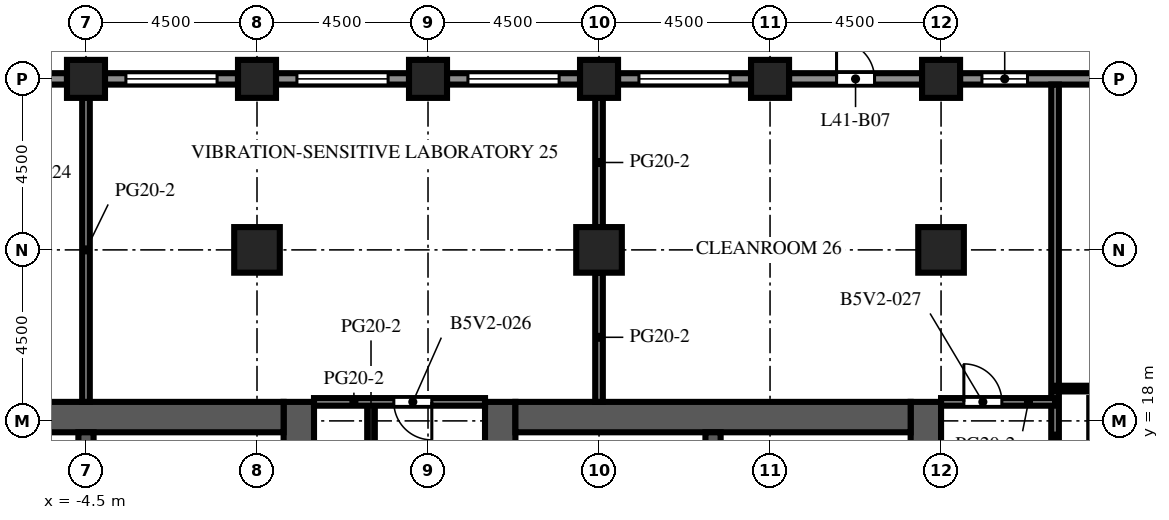
"""IFC4 building model, lengths in metres.
Left out: names, types, materials, properties, quantities, classifications, styles, units other than length and angle.
Written with IfcOpenShell. Run it as: python <this file> out.ifc"""

import sys

from ifc_helpers import new_model, si_unit, direction, frame, frame_2d, origin, origin_2d, place, context, subcontext, project, spatial, rectangle, extrude, element, fill, save


model = new_model("IFC4")
c1 = context("Model", 3, precision=1e-05, world=origin(), true_north=direction((0.0, 1.0)))
c2 = subcontext(c1, "Body", "Model", "MODEL_VIEW")
j1 = project(units=[si_unit("LENGTHUNIT", "METRE"), si_unit("PLANEANGLEUNIT", "RADIAN")], contexts=[c1])
p1 = place(None, origin())
s1 = spatial("IfcSite", under=j1, at=p1, CompositionType="ELEMENT")
p2 = place(p1, origin())
s2 = spatial("IfcBuilding", under=s1, at=p2, CompositionType="ELEMENT")
p3 = place(p2, frame((0.0, 0.0, 181.4)))
s3 = spatial("IfcBuildingStorey", under=s2, at=p3, CompositionType="ELEMENT", Elevation=181.4)
for number, where, z_axis, x_axis in (
    (1, (-4.5, 27.0, 0.0), (0.0, 0.0, 1.0), (1.0, 0.0, 0.0)),
    (2, (0.0, 27.0, 0.0), (0.0, 0.0, 1.0), (1.0, 0.0, 0.0)),
    (3, (4.5, 27.0, 0.0), (0.0, 0.0, 1.0), (1.0, 0.0, 0.0)),
    (4, (9.0, 27.0, 0.0), (0.0, 0.0, 1.0), (1.0, 0.0, 0.0)),
    (5, (13.5, 27.0, 0.0), (0.0, 0.0, 1.0), (1.0, 0.0, 0.0)),
    (6, (18.0, 27.0, 0.0), (0.0, 0.0, 1.0), (1.0, 0.0, 0.0)),
):
    element("IfcColumn", number, at=place(p3, frame(where, z_axis=z_axis, x_axis=x_axis)), inside=s3, PredefinedType="COLUMN", context=c2, shape_type="SweptSolid", body=[
        extrude(rectangle(XDim=1.0, YDim=1.0, at=origin_2d()), origin(), (0.0, 0.0, 1.0), 4.1),
    ])
for number, where, z_axis, x_axis in (
    (7, (0.0, 22.5, 0.0), (0.0, 0.0, 1.0), (1.0, 0.0, 0.0)),
    (8, (9.0, 22.5, 0.0), (0.0, 0.0, 1.0), (1.0, 0.0, 0.0)),
    (9, (18.0, 22.5, 0.0), (0.0, 0.0, 1.0), (1.0, 0.0, 0.0)),
):
    element("IfcColumn", number, at=place(p3, frame(where, z_axis=z_axis, x_axis=x_axis)), inside=s3, PredefinedType="COLUMN", context=c2, shape_type="SweptSolid", body=[
        extrude(rectangle(XDim=1.2, YDim=1.2, at=origin_2d()), origin(), (0.0, 0.0, 1.0), 4.1),
    ])
p4 = place(p3, frame((1.1, -9.0, 0.0), z_axis=(0.0, 0.0, 1.0), x_axis=(0.0, 1.0, 0.0)))
e10 = element("IfcWall", 10, at=p4, inside=s3, PredefinedType="SHEAR", context=c2, shape_type="SweptSolid", body=[
    extrude(rectangle(XDim=27.5, YDim=0.8, at=frame_2d((13.75, 0.0))), origin(), (0.0, 0.0, 1.0), 4.1),
])
p5 = place(p4, frame((12.55, 0.0, 0.0)))
e11 = element("IfcOpeningElement", 11, at=p5, cuts=e10, PredefinedType="OPENING", context=c2, shape_type="SweptSolid", body=[
    extrude(rectangle(XDim=2.4, YDim=2.4, at=frame_2d((1.2, 1.2))), frame((0.0, 0.41, 0.0), z_axis=(0.0, -1.0, 0.0), x_axis=(1.0, 0.0, 0.0)), (0.0, 0.0, 1.0), 0.82),
])
p6 = place(p4, frame((3.85, 0.0, 0.0)))
e12 = element("IfcOpeningElement", 12, at=p6, cuts=e10, PredefinedType="OPENING", context=c2, shape_type="SweptSolid", body=[
    extrude(rectangle(XDim=0.95, YDim=2.1, at=frame_2d((0.475, 1.05))), frame((0.0, 0.41, 0.0), z_axis=(0.0, -1.0, 0.0), x_axis=(1.0, 0.0, 0.0)), (0.0, 0.0, 1.0), 0.82),
])
p7 = place(p4, frame((23.475, 0.0, 0.0)))
e13 = element("IfcOpeningElement", 13, at=p7, cuts=e10, PredefinedType="OPENING", context=c2, shape_type="SweptSolid", body=[
    extrude(rectangle(XDim=1.2, YDim=2.1, at=frame_2d((0.6, 1.05))), frame((0.0, 0.41, 0.0), z_axis=(0.0, -1.0, 0.0), x_axis=(1.0, 0.0, 0.0)), (0.0, 0.0, 1.0), 0.82),
])
p8 = place(p3, frame((-9.7, 18.1, 0.0), z_axis=(0.0, 0.0, 1.0), x_axis=(1.0, 0.0, 0.0)))
e14 = element("IfcWall", 14, at=p8, inside=s3, PredefinedType="SHEAR", context=c2, shape_type="SweptSolid", body=[
    extrude(rectangle(XDim=10.4, YDim=0.8, at=frame_2d((5.2, 0.0))), origin(), (0.0, 0.0, 1.0), 4.1),
])
p9 = place(p3, frame((-4.5, 10.2, 0.0), z_axis=(0.0, 0.0, 1.0), x_axis=(0.0, 1.0, 0.0)))
e15 = element("IfcWall", 15, at=p9, inside=s3, PredefinedType="SHEAR", context=c2, shape_type="SweptSolid", body=[
    extrude(rectangle(XDim=7.5, YDim=0.4, at=frame_2d((3.75, 0.0))), origin(), (0.0, 0.0, 1.0), 4.1),
])
p10 = place(p3, frame((6.4, -9.0, 0.0), z_axis=(0.0, 0.0, 1.0), x_axis=(0.0, 1.0, 0.0)))
e16 = element("IfcWall", 16, at=p10, inside=s3, PredefinedType="SHEAR", context=c2, shape_type="SweptSolid", body=[
    extrude(rectangle(XDim=27.5, YDim=0.8, at=frame_2d((13.75, 0.0))), origin(), (0.0, 0.0, 1.0), 4.1),
])
p11 = place(p10, frame((12.55, 0.0, 0.0)))
e17 = element("IfcOpeningElement", 17, at=p11, cuts=e16, PredefinedType="OPENING", context=c2, shape_type="SweptSolid", body=[
    extrude(rectangle(XDim=2.4, YDim=2.4, at=frame_2d((1.2, 1.2))), frame((0.0, 0.41, 0.0), z_axis=(0.0, -1.0, 0.0), x_axis=(1.0, 0.0, 0.0)), (0.0, 0.0, 1.0), 0.82),
])
p12 = place(p10, frame((3.85, 0.0, 0.0)))
e18 = element("IfcOpeningElement", 18, at=p12, cuts=e16, PredefinedType="OPENING", context=c2, shape_type="SweptSolid", body=[
    extrude(rectangle(XDim=0.95, YDim=2.1, at=frame_2d((0.475, 1.05))), frame((0.0, 0.41, 0.0), z_axis=(0.0, -1.0, 0.0), x_axis=(1.0, 0.0, 0.0)), (0.0, 0.0, 1.0), 0.82),
])
p13 = place(p10, frame((23.475, 0.0, 0.0)))
e19 = element("IfcOpeningElement", 19, at=p13, cuts=e16, PredefinedType="OPENING", context=c2, shape_type="SweptSolid", body=[
    extrude(rectangle(XDim=1.2, YDim=2.1, at=frame_2d((0.6, 1.05))), frame((0.0, 0.41, 0.0), z_axis=(0.0, -1.0, 0.0), x_axis=(1.0, 0.0, 0.0)), (0.0, 0.0, 1.0), 0.82),
])
p14 = place(p3, frame((17.6, -9.0, 0.0), z_axis=(0.0, 0.0, 1.0), x_axis=(0.0, 1.0, 0.0)))
e20 = element("IfcWall", 20, at=p14, inside=s3, PredefinedType="SHEAR", context=c2, shape_type="SweptSolid", body=[
    extrude(rectangle(XDim=27.5, YDim=0.8, at=frame_2d((13.75, 0.0))), origin(), (0.0, 0.0, 1.0), 4.1),
])
p15 = place(p14, frame((12.55, 0.0, 0.0)))
e21 = element("IfcOpeningElement", 21, at=p15, cuts=e20, PredefinedType="OPENING", context=c2, shape_type="SweptSolid", body=[
    extrude(rectangle(XDim=2.4, YDim=2.4, at=frame_2d((1.2, 1.2))), frame((0.0, 0.41, 0.0), z_axis=(0.0, -1.0, 0.0), x_axis=(1.0, 0.0, 0.0)), (0.0, 0.0, 1.0), 0.82),
])
p16 = place(p14, frame((6.825, 0.0, 0.0)))
e22 = element("IfcOpeningElement", 22, at=p16, cuts=e20, PredefinedType="OPENING", context=c2, shape_type="SweptSolid", body=[
    extrude(rectangle(XDim=1.2, YDim=2.1, at=frame_2d((0.6, 1.05))), frame((0.0, 0.41, 0.0), z_axis=(0.0, -1.0, 0.0), x_axis=(1.0, 0.0, 0.0)), (0.0, 0.0, 1.0), 0.82),
])
p17 = place(p14, frame((19.475, 0.0, 0.0)))
e23 = element("IfcOpeningElement", 23, at=p17, cuts=e20, PredefinedType="OPENING", context=c2, shape_type="SweptSolid", body=[
    extrude(rectangle(XDim=1.2, YDim=2.1, at=frame_2d((0.6, 1.05))), frame((0.0, 0.41, 0.0), z_axis=(0.0, -1.0, 0.0), x_axis=(1.0, 0.0, 0.0)), (0.0, 0.0, 1.0), 0.82),
])
p18 = place(p3, frame((6.8, 18.1, 0.0), z_axis=(0.0, 0.0, 1.0), x_axis=(1.0, 0.0, 0.0)))
e24 = element("IfcWall", 24, at=p18, inside=s3, PredefinedType="SHEAR", context=c2, shape_type="SweptSolid", body=[
    extrude(rectangle(XDim=10.4, YDim=0.8, at=frame_2d((5.2, 0.0))), origin(), (0.0, 0.0, 1.0), 4.1),
])
p19 = place(p3, frame((12.0, 10.2, 0.0), z_axis=(0.0, 0.0, 1.0), x_axis=(0.0, 1.0, 0.0)))
e25 = element("IfcWall", 25, at=p19, inside=s3, PredefinedType="SHEAR", context=c2, shape_type="SweptSolid", body=[
    extrude(rectangle(XDim=7.5, YDim=0.4, at=frame_2d((3.75, 0.0))), origin(), (0.0, 0.0, 1.0), 4.1),
])
p20 = place(p3, frame((18.5, 27.0, 0.0), z_axis=(0.0, 0.0, 1.0), x_axis=(1.0, 0.0, 0.0)))
e26 = element("IfcWall", 26, at=p20, inside=s3, PredefinedType="SOLIDWALL", context=c2, shape_type="SweptSolid", body=[
    extrude(rectangle(XDim=3.5, YDim=0.3, at=frame_2d((1.75, 0.0))), origin(), (0.0, 0.0, 1.0), 2.7),
])
p21 = place(p20, frame((0.575, 0.0, 0.8)))
e27 = element("IfcOpeningElement", 27, at=p21, cuts=e26, PredefinedType="OPENING", context=c2, shape_type="SweptSolid", body=[
    extrude(rectangle(XDim=1.2, YDim=1.7, at=frame_2d((0.6, 0.85))), frame((0.0, 0.16, 0.0), z_axis=(0.0, -1.0, 0.0), x_axis=(1.0, 0.0, 0.0)), (0.0, 0.0, 1.0), 0.32),
])
p22 = place(p3, frame((14.0, 27.0, 0.0), z_axis=(0.0, 0.0, 1.0), x_axis=(1.0, 0.0, 0.0)))
e28 = element("IfcWall", 28, at=p22, inside=s3, PredefinedType="SOLIDWALL", context=c2, shape_type="SweptSolid", body=[
    extrude(rectangle(XDim=3.5, YDim=0.3, at=frame_2d((1.75, 0.0))), origin(), (0.0, 0.0, 1.0), 2.7),
])
p23 = place(p22, frame((1.25, 0.0, 0.0)))
e29 = element("IfcOpeningElement", 29, at=p23, cuts=e28, PredefinedType="OPENING", context=c2, shape_type="SweptSolid", body=[
    extrude(rectangle(XDim=1.0, YDim=2.2, at=frame_2d((0.5, 1.1))), frame((0.0, 0.16, 0.0), z_axis=(0.0, -1.0, 0.0), x_axis=(1.0, 0.0, 0.0)), (0.0, 0.0, 1.0), 0.32),
])
p24 = place(p3, frame((9.5, 27.0, 0.0), z_axis=(0.0, 0.0, 1.0), x_axis=(1.0, 0.0, 0.0)))
e30 = element("IfcWall", 30, at=p24, inside=s3, PredefinedType="SOLIDWALL", context=c2, shape_type="SweptSolid", body=[
    extrude(rectangle(XDim=3.5, YDim=0.3, at=frame_2d((1.75, 0.0))), origin(), (0.0, 0.0, 1.0), 2.7),
])
p25 = place(p24, frame((0.55, 0.0, 0.8)))
e31 = element("IfcOpeningElement", 31, at=p25, cuts=e30, PredefinedType="OPENING", context=c2, shape_type="SweptSolid", body=[
    extrude(rectangle(XDim=2.4, YDim=1.7, at=frame_2d((1.2, 0.85))), frame((0.0, 0.16, 0.0), z_axis=(0.0, -1.0, 0.0), x_axis=(1.0, 0.0, 0.0)), (0.0, 0.0, 1.0), 0.32),
])
p26 = place(p3, frame((5.0, 27.0, 0.0), z_axis=(0.0, 0.0, 1.0), x_axis=(1.0, 0.0, 0.0)))
e32 = element("IfcWall", 32, at=p26, inside=s3, PredefinedType="SOLIDWALL", context=c2, shape_type="SweptSolid", body=[
    extrude(rectangle(XDim=3.5, YDim=0.3, at=frame_2d((1.75, 0.0))), origin(), (0.0, 0.0, 1.0), 2.7),
])
p27 = place(p26, frame((0.55, 0.0, 0.8)))
e33 = element("IfcOpeningElement", 33, at=p27, cuts=e32, PredefinedType="OPENING", context=c2, shape_type="SweptSolid", body=[
    extrude(rectangle(XDim=2.4, YDim=1.7, at=frame_2d((1.2, 0.85))), frame((0.0, 0.16, 0.0), z_axis=(0.0, -1.0, 0.0), x_axis=(1.0, 0.0, 0.0)), (0.0, 0.0, 1.0), 0.32),
])
p28 = place(p3, frame((0.5, 27.0, 0.0), z_axis=(0.0, 0.0, 1.0), x_axis=(1.0, 0.0, 0.0)))
e34 = element("IfcWall", 34, at=p28, inside=s3, PredefinedType="SOLIDWALL", context=c2, shape_type="SweptSolid", body=[
    extrude(rectangle(XDim=3.5, YDim=0.3, at=frame_2d((1.75, 0.0))), origin(), (0.0, 0.0, 1.0), 2.7),
])
p29 = place(p28, frame((0.55, 0.0, 0.8)))
e35 = element("IfcOpeningElement", 35, at=p29, cuts=e34, PredefinedType="OPENING", context=c2, shape_type="SweptSolid", body=[
    extrude(rectangle(XDim=2.4, YDim=1.7, at=frame_2d((1.2, 0.85))), frame((0.0, 0.16, 0.0), z_axis=(0.0, -1.0, 0.0), x_axis=(1.0, 0.0, 0.0)), (0.0, 0.0, 1.0), 0.32),
])
p30 = place(p3, frame((-4.0, 27.0, 0.0), z_axis=(0.0, 0.0, 1.0), x_axis=(1.0, 0.0, 0.0)))
e36 = element("IfcWall", 36, at=p30, inside=s3, PredefinedType="SOLIDWALL", context=c2, shape_type="SweptSolid", body=[
    extrude(rectangle(XDim=3.5, YDim=0.3, at=frame_2d((1.75, 0.0))), origin(), (0.0, 0.0, 1.0), 2.7),
])
p31 = place(p30, frame((0.55, 0.0, 0.8)))
e37 = element("IfcOpeningElement", 37, at=p31, cuts=e36, PredefinedType="OPENING", context=c2, shape_type="SweptSolid", body=[
    extrude(rectangle(XDim=2.4, YDim=1.7, at=frame_2d((1.2, 0.85))), frame((0.0, 0.16, 0.0), z_axis=(0.0, -1.0, 0.0), x_axis=(1.0, 0.0, 0.0)), (0.0, 0.0, 1.0), 0.32),
])
p32 = place(p3, frame((-8.5, 27.0, 0.0), z_axis=(0.0, 0.0, 1.0), x_axis=(1.0, 0.0, 0.0)))
e38 = element("IfcWall", 38, at=p32, inside=s3, PredefinedType="SOLIDWALL", context=c2, shape_type="SweptSolid", body=[
    extrude(rectangle(XDim=3.5, YDim=0.3, at=frame_2d((1.75, 0.0))), origin(), (0.0, 0.0, 1.0), 2.7),
])
p33 = place(p32, frame((0.55, 0.0, 0.8)))
e39 = element("IfcOpeningElement", 39, at=p33, cuts=e38, PredefinedType="OPENING", context=c2, shape_type="SweptSolid", body=[
    extrude(rectangle(XDim=2.4, YDim=1.7, at=frame_2d((1.2, 0.85))), frame((0.0, 0.16, 0.0), z_axis=(0.0, -1.0, 0.0), x_axis=(1.0, 0.0, 0.0)), (0.0, 0.0, 1.0), 0.32),
])
p34 = place(p3, frame((-0.6, 15.075, 0.0), z_axis=(0.0, 0.0, 1.0), x_axis=(0.0, 1.0, 0.0)))
e40 = element("IfcWall", 40, at=p34, inside=s3, PredefinedType="PARTITIONING", context=c2, shape_type="SweptSolid", body=[
    extrude(rectangle(XDim=2.625, YDim=0.1, at=frame_2d((1.312, 0.0))), origin(), (0.0, 0.0, 1.0), 3.5),
])
p35 = place(p34, frame((0.812, 0.0, 0.0)))
e41 = element("IfcOpeningElement", 41, at=p35, cuts=e40, PredefinedType="OPENING", context=c2, shape_type="SweptSolid", body=[
    extrude(rectangle(XDim=1.0, YDim=2.1, at=frame_2d((0.5, 1.05))), frame((0.0, 0.06, 0.0), z_axis=(0.0, -1.0, 0.0), x_axis=(1.0, 0.0, 0.0)), (0.0, 0.0, 1.0), 0.12),
])
p36 = place(p3, frame((8.1, 15.075, 0.0), z_axis=(0.0, 0.0, 1.0), x_axis=(0.0, 1.0, 0.0)))
e42 = element("IfcWall", 42, at=p36, inside=s3, PredefinedType="PARTITIONING", context=c2, shape_type="SweptSolid", body=[
    extrude(rectangle(XDim=2.625, YDim=0.1, at=frame_2d((1.312, 0.0))), origin(), (0.0, 0.0, 1.0), 3.5),
])
p37 = place(p36, frame((0.812, 0.0, 0.0)))
e43 = element("IfcOpeningElement", 43, at=p37, cuts=e42, PredefinedType="OPENING", context=c2, shape_type="SweptSolid", body=[
    extrude(rectangle(XDim=1.0, YDim=2.1, at=frame_2d((0.5, 1.05))), frame((0.0, 0.06, 0.0), z_axis=(0.0, -1.0, 0.0), x_axis=(1.0, 0.0, 0.0)), (0.0, 0.0, 1.0), 0.12),
])
p38 = place(p3, frame((-4.5, 18.5, 0.0), z_axis=(0.0, 0.0, 1.0), x_axis=(0.0, 1.0, 0.0)))
e44 = element("IfcWall", 44, at=p38, inside=s3, PredefinedType="PARTITIONING", context=c2, shape_type="SweptSolid", body=[
    extrude(rectangle(XDim=8.0, YDim=0.2, at=frame_2d((4.0, 0.0))), origin(), (0.0, 0.0, 1.0), 3.5),
])
p39 = place(p3, frame((3.0, 6.7, 0.0), z_axis=(0.0, 0.0, 1.0), x_axis=(0.0, 1.0, 0.0)))
e45 = element("IfcWall", 45, at=p39, inside=s3, PredefinedType="PARTITIONING", context=c2, shape_type="SweptSolid", body=[
    extrude(rectangle(XDim=11.8, YDim=0.2, at=frame_2d((5.9, 0.0))), origin(), (0.0, 0.0, 1.0), 3.5),
])
p40 = place(p39, frame((4.35, 0.0, 0.0)))
e46 = element("IfcOpeningElement", 46, at=p40, cuts=e45, PredefinedType="OPENING", context=c2, shape_type="SweptSolid", body=[
    extrude(rectangle(XDim=1.0, YDim=2.1, at=frame_2d((0.5, 1.05))), frame((0.0, 0.11, 0.0), z_axis=(0.0, -1.0, 0.0), x_axis=(1.0, 0.0, 0.0)), (0.0, 0.0, 1.0), 0.22),
])
for number, where, z_axis, x_axis in (
    (47, (9.0, 18.5, 0.0), (0.0, 0.0, 1.0), (0.0, 1.0, 0.0)),
    (48, (9.0, 23.1, 0.0), (0.0, 0.0, 1.0), (0.0, 1.0, 0.0)),
):
    element("IfcWall", number, at=place(p3, frame(where, z_axis=z_axis, x_axis=x_axis)), inside=s3, PredefinedType="PARTITIONING", context=c2, shape_type="SweptSolid", body=[
        extrude(rectangle(XDim=3.4, YDim=0.2, at=frame_2d((1.7, 0.0))), origin(), (0.0, 0.0, 1.0), 3.5),
    ])
p41 = place(p3, frame((21.0, 26.85, 0.0), z_axis=(0.0, 0.0, 1.0), x_axis=(0.0, -1.0, 0.0)))
e49 = element("IfcWall", 49, at=p41, inside=s3, PredefinedType="PARTITIONING", context=c2, shape_type="SweptSolid", body=[
    extrude(rectangle(XDim=20.6, YDim=0.2, at=frame_2d((10.3, 0.0))), origin(), (0.0, 0.0, 1.0), 3.5),
])
p42 = place(p41, frame((18.5, 0.0, 0.0)))
e50 = element("IfcOpeningElement", 50, at=p42, cuts=e49, PredefinedType="OPENING", context=c2, shape_type="SweptSolid", body=[
    extrude(rectangle(XDim=1.0, YDim=2.1, at=frame_2d((0.5, 1.05))), frame((0.0, 0.11, 0.0), z_axis=(0.0, -1.0, 0.0), x_axis=(1.0, 0.0, 0.0)), (0.0, 0.0, 1.0), 0.22),
])
p43 = place(p3, frame((1.5, 18.5, 0.0), z_axis=(0.0, 0.0, 1.0), x_axis=(1.0, 0.0, 0.0)))
e51 = element("IfcWall", 51, at=p43, inside=s3, PredefinedType="PARTITIONING", context=c2, shape_type="SweptSolid", body=[
    extrude(rectangle(XDim=4.5, YDim=0.2, at=frame_2d((2.25, 0.0))), origin(), (0.0, 0.0, 1.0), 3.5),
])
p44 = place(p43, frame((2.1, 0.0, 0.0)))
e52 = element("IfcOpeningElement", 52, at=p44, cuts=e51, PredefinedType="OPENING", context=c2, shape_type="SweptSolid", body=[
    extrude(rectangle(XDim=1.0, YDim=2.1, at=frame_2d((0.5, 1.05))), frame((0.0, 0.11, 0.0), z_axis=(0.0, -1.0, 0.0), x_axis=(1.0, 0.0, 0.0)), (0.0, 0.0, 1.0), 0.22),
])
p45 = place(p3, frame((18.0, 18.5, 0.0), z_axis=(0.0, 0.0, 1.0), x_axis=(1.0, 0.0, 0.0)))
e53 = element("IfcWall", 53, at=p45, inside=s3, PredefinedType="PARTITIONING", context=c2, shape_type="SweptSolid", body=[
    extrude(rectangle(XDim=3.0, YDim=0.2, at=frame_2d((1.5, 0.0))), origin(), (0.0, 0.0, 1.0), 3.5),
])
p46 = place(p45, frame((0.6, 0.0, 0.0)))
e54 = element("IfcOpeningElement", 54, at=p46, cuts=e53, PredefinedType="OPENING", context=c2, shape_type="SweptSolid", body=[
    extrude(rectangle(XDim=1.0, YDim=2.1, at=frame_2d((0.5, 1.05))), frame((0.0, 0.11, 0.0), z_axis=(0.0, -1.0, 0.0), x_axis=(1.0, 0.0, 0.0)), (0.0, 0.0, 1.0), 0.22),
])
p47 = place(p3, frame((21.0, 18.85, 0.0), z_axis=(0.0, 0.0, 1.0), x_axis=(1.0, 0.0, 0.0)))
e55 = element("IfcWall", 55, at=p47, inside=s3, PredefinedType="PARTITIONING", context=c2, shape_type="SweptSolid", body=[
    extrude(rectangle(XDim=5.85, YDim=0.15, at=frame_2d((2.925, 0.0))), origin(), (0.0, 0.0, 1.0), 3.5),
])
p48 = place(p47, frame((2.6, 0.0, 0.0)))
e56 = element("IfcOpeningElement", 56, at=p48, cuts=e55, PredefinedType="OPENING", context=c2, shape_type="SweptSolid", body=[
    extrude(rectangle(XDim=1.0, YDim=2.1, at=frame_2d((0.5, 1.05))), frame((0.0, 0.085, 0.0), z_axis=(0.0, -1.0, 0.0), x_axis=(1.0, 0.0, 0.0)), (0.0, 0.0, 1.0), 0.17),
])
p49 = place(p21, origin())
e57 = element("IfcWindow", 57, at=p49, inside=s3, PartitioningType="SINGLE_PANEL", PredefinedType="WINDOW", context=c2, shape_type="SweptSolid", body=[
    extrude(rectangle(XDim=1.2, YDim=1.7, at=frame_2d((0.6, 0.85))), frame((0.0, 0.03, 0.0), z_axis=(0.0, -1.0, 0.0), x_axis=(1.0, 0.0, 0.0)), (0.0, 0.0, 1.0), 0.06),
])
fill(e27, e57)
p50 = place(p23, origin())
e58 = element("IfcDoor", 58, at=p50, inside=s3, OperationType="SINGLE_SWING_LEFT", PredefinedType="DOOR", context=c2, shape_type="SweptSolid", body=[
    extrude(rectangle(XDim=1.0, YDim=2.2, at=frame_2d((0.5, 1.1))), frame((0.0, 0.025, 0.0), z_axis=(0.0, -1.0, 0.0), x_axis=(1.0, 0.0, 0.0)), (0.0, 0.0, 1.0), 0.05),
])
fill(e29, e58)
p51 = place(p25, origin())
e59 = element("IfcWindow", 59, at=p51, inside=s3, PartitioningType="SINGLE_PANEL", PredefinedType="WINDOW", context=c2, shape_type="SweptSolid", body=[
    extrude(rectangle(XDim=2.4, YDim=1.7, at=frame_2d((1.2, 0.85))), frame((0.0, 0.03, 0.0), z_axis=(0.0, -1.0, 0.0), x_axis=(1.0, 0.0, 0.0)), (0.0, 0.0, 1.0), 0.06),
])
fill(e31, e59)
p52 = place(p27, origin())
e60 = element("IfcWindow", 60, at=p52, inside=s3, PartitioningType="SINGLE_PANEL", PredefinedType="WINDOW", context=c2, shape_type="SweptSolid", body=[
    extrude(rectangle(XDim=2.4, YDim=1.7, at=frame_2d((1.2, 0.85))), frame((0.0, 0.03, 0.0), z_axis=(0.0, -1.0, 0.0), x_axis=(1.0, 0.0, 0.0)), (0.0, 0.0, 1.0), 0.06),
])
fill(e33, e60)
p53 = place(p29, origin())
e61 = element("IfcWindow", 61, at=p53, inside=s3, PartitioningType="SINGLE_PANEL", PredefinedType="WINDOW", context=c2, shape_type="SweptSolid", body=[
    extrude(rectangle(XDim=2.4, YDim=1.7, at=frame_2d((1.2, 0.85))), frame((0.0, 0.03, 0.0), z_axis=(0.0, -1.0, 0.0), x_axis=(1.0, 0.0, 0.0)), (0.0, 0.0, 1.0), 0.06),
])
fill(e35, e61)
p54 = place(p31, origin())
e62 = element("IfcWindow", 62, at=p54, inside=s3, PartitioningType="SINGLE_PANEL", PredefinedType="WINDOW", context=c2, shape_type="SweptSolid", body=[
    extrude(rectangle(XDim=2.4, YDim=1.7, at=frame_2d((1.2, 0.85))), frame((0.0, 0.03, 0.0), z_axis=(0.0, -1.0, 0.0), x_axis=(1.0, 0.0, 0.0)), (0.0, 0.0, 1.0), 0.06),
])
fill(e37, e62)
p55 = place(p44, origin())
e63 = element("IfcDoor", 63, at=p55, inside=s3, OperationType="SINGLE_SWING_RIGHT", PredefinedType="DOOR", context=c2, shape_type="SweptSolid", body=[
    extrude(rectangle(XDim=1.0, YDim=2.1, at=frame_2d((0.5, 1.05))), frame((0.0, 0.025, 0.0), z_axis=(0.0, -1.0, 0.0), x_axis=(1.0, 0.0, 0.0)), (0.0, 0.0, 1.0), 0.05),
])
fill(e52, e63)
p56 = place(p46, origin())
e64 = element("IfcDoor", 64, at=p56, inside=s3, OperationType="SINGLE_SWING_LEFT", PredefinedType="DOOR", context=c2, shape_type="SweptSolid", body=[
    extrude(rectangle(XDim=1.0, YDim=2.1, at=frame_2d((0.5, 1.05))), frame((0.0, 0.025, 0.0), z_axis=(0.0, -1.0, 0.0), x_axis=(1.0, 0.0, 0.0)), (0.0, 0.0, 1.0), 0.05),
])
fill(e54, e64)
save(model, sys.argv[1])
